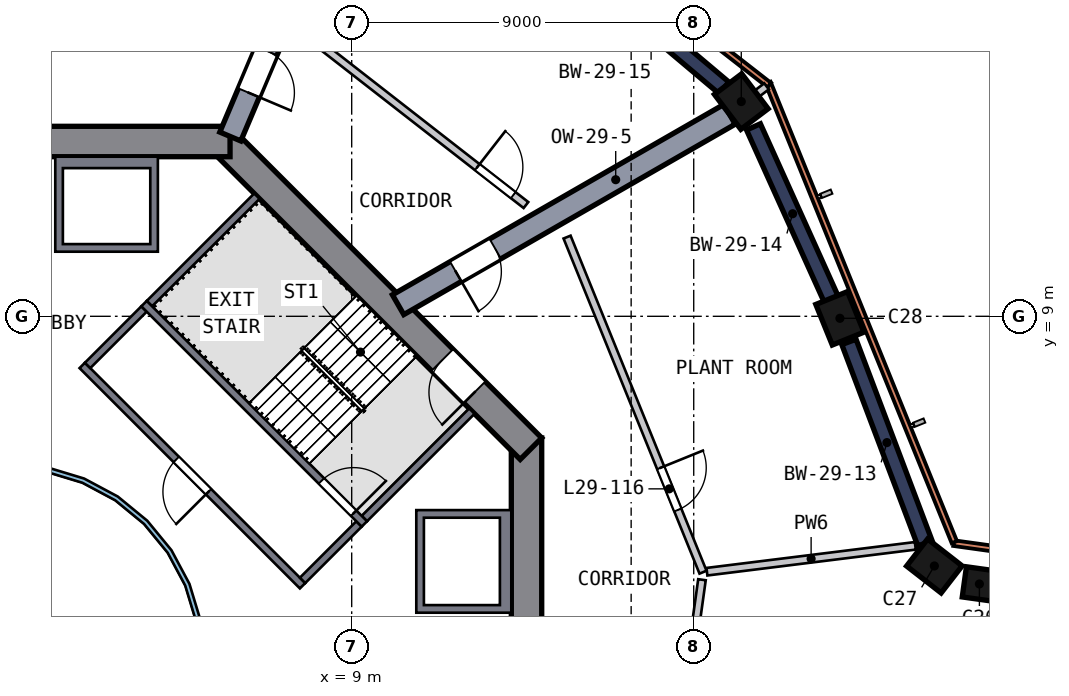
"""IFC4 building model, lengths in metres.
Left out: names, types, materials, properties, quantities, classifications, styles, units other than length and angle.
Written with IfcOpenShell. Run it as: python <this file> out.ifc"""

import sys

from ifc_helpers import new_model, si_unit, direction, frame, frame_2d, origin, origin_2d, place, context, subcontext, project, spatial, polyline, rectangle, outline, extrude, element, fill, save


model = new_model("IFC4")
c1 = context("Model", 3, precision=1e-05, world=origin(), true_north=direction((0.0, 1.0)))
c2 = subcontext(c1, "Body", "Model", "MODEL_VIEW")
j1 = project(units=[si_unit("LENGTHUNIT", "METRE"), si_unit("PLANEANGLEUNIT", "RADIAN")], contexts=[c1])
p1 = place(None, origin())
s1 = spatial("IfcSite", under=j1, at=p1, CompositionType="ELEMENT")
p2 = place(p1, origin())
s2 = spatial("IfcBuilding", under=s1, at=p2, CompositionType="ELEMENT")
p3 = place(p2, frame((0.0, 0.0, 122.0)))
s3 = spatial("IfcBuildingStorey", under=s2, at=p3, CompositionType="ELEMENT", Elevation=122.0)
p4 = place(p3, frame((25.524, 1.871, 0.0), z_axis=(-0.005790352, 0.071053566, 0.997455695), x_axis=(-0.990459232, 0.136931133, -0.015503999)))
e1 = element("IfcColumn", 1, at=p4, inside=s3, PredefinedType="COLUMN", context=c2, shape_type="SweptSolid", body=[
    extrude(rectangle(XDim=0.8, YDim=0.8, at=origin_2d()), origin(), (0.0, 0.0, 1.0), 4.511),
])
p5 = place(p3, frame((24.341, 2.348, 0.0), z_axis=(-0.007144812, 0.067767459, 0.99767556), x_axis=(0.789708349, -0.611663802, 0.04720294)))
e2 = element("IfcColumn", 2, at=p5, inside=s3, PredefinedType="COLUMN", context=c2, shape_type="SweptSolid", body=[
    extrude(rectangle(XDim=1.15, YDim=0.9, at=origin_2d()), origin(), (0.0, 0.0, 1.0), 4.51),
])
p6 = place(p3, frame((21.877, 8.875, 0.0), z_axis=(-0.025227376, 0.060740591, 0.997834736), x_axis=(-0.374966282, 0.924702521, -0.0657688)))
e3 = element("IfcColumn", 3, at=p6, inside=s3, PredefinedType="COLUMN", context=c2, shape_type="SweptSolid", body=[
    extrude(rectangle(XDim=1.15, YDim=0.9, at=origin_2d()), origin(), (0.0, 0.0, 1.0), 4.51),
])
p7 = place(p3, frame((19.301, 14.586, 0.0), z_axis=(-0.041084756, 0.053426422, 0.997726245), x_axis=(0.60153064, -0.796001802, 0.067394506)))
e4 = element("IfcColumn", 4, at=p7, inside=s3, PredefinedType="COLUMN", context=c2, shape_type="SweptSolid", body=[
    extrude(rectangle(XDim=1.15, YDim=0.9, at=origin_2d()), origin(), (0.0, 0.0, 1.0), 4.51),
])
p8 = place(p3, frame((13.6, -5.799, 0.0), z_axis=(0.0, 0.0, 1.0), x_axis=(0.0, 1.0, 0.0)))
e5 = element("IfcWall", 5, at=p8, inside=s3, PredefinedType="SHEAR", context=c2, shape_type="SweptSolid", body=[
    extrude(rectangle(XDim=11.598, YDim=0.8, at=frame_2d((5.799, 0.0))), origin(), (0.0, 0.0, 1.0), 6.0),
])
p9 = place(p8, frame((4.899, 0.0, 0.0)))
e6 = element("IfcOpeningElement", 6, at=p9, cuts=e5, PredefinedType="OPENING", context=c2, shape_type="SweptSolid", body=[
    extrude(rectangle(XDim=1.8, YDim=2.1, at=frame_2d((0.9, 1.05))), frame((0.0, 0.41, 0.0), z_axis=(0.0, -1.0, 0.0), x_axis=(1.0, 0.0, 0.0)), (0.0, 0.0, 1.0), 0.82),
])
p10 = place(p3, frame((13.717, 5.516, 0.0), z_axis=(0.0, 0.0, 1.0), x_axis=(-0.707106781, 0.707106781, 0.0)))
e7 = element("IfcWall", 7, at=p10, inside=s3, PredefinedType="SHEAR", context=c2, shape_type="SweptSolid", body=[
    extrude(rectangle(XDim=11.598, YDim=0.8, at=frame_2d((5.799, 0.0))), origin(), (0.0, 0.0, 1.0), 6.0),
])
p11 = place(p10, frame((2.099, 0.0, 0.0)))
e8 = element("IfcOpeningElement", 8, at=p11, cuts=e7, PredefinedType="OPENING", context=c2, shape_type="SweptSolid", body=[
    extrude(rectangle(XDim=1.2, YDim=2.1, at=frame_2d((0.6, 1.05))), frame((0.0, 0.41, 0.0), z_axis=(0.0, -1.0, 0.0), x_axis=(1.0, 0.0, 0.0)), (0.0, 0.0, 1.0), 0.82),
])
p12 = place(p3, frame((5.799, 13.6, 0.0), z_axis=(0.0, 0.0, 1.0), x_axis=(-1.0, 0.0, 0.0)))
e9 = element("IfcWall", 9, at=p12, inside=s3, PredefinedType="SHEAR", context=c2, shape_type="SweptSolid", body=[
    extrude(rectangle(XDim=11.598, YDim=0.8, at=frame_2d((5.799, 0.0))), origin(), (0.0, 0.0, 1.0), 6.0),
])
p13 = place(p12, frame((4.899, 0.0, 0.0)))
e10 = element("IfcOpeningElement", 10, at=p13, cuts=e9, PredefinedType="OPENING", context=c2, shape_type="SweptSolid", body=[
    extrude(rectangle(XDim=1.8, YDim=2.1, at=frame_2d((0.9, 1.05))), frame((0.0, 0.41, 0.0), z_axis=(0.0, -1.0, 0.0), x_axis=(1.0, 0.0, 0.0)), (0.0, 0.0, 1.0), 0.82),
])
p14 = place(p3, frame((24.084, 3.027, 0.0), z_axis=(0.0, 0.0, 1.0), x_axis=(-0.353210296, 0.935543952, 0.0)))
e11 = element("IfcWall", 11, at=p14, inside=s3, PredefinedType="SHEAR", context=c2, shape_type="SweptSolid", body=[
    extrude(rectangle(XDim=5.664, YDim=0.4, at=frame_2d((2.832, 0.0))), origin(), (0.0, 0.0, 1.0), 4.5),
])
p15 = place(p3, frame((21.634, 9.414, 0.0), z_axis=(0.0, 0.0, 1.0), x_axis=(-0.411115687, 0.911583179, 0.0)))
e12 = element("IfcWall", 12, at=p15, inside=s3, PredefinedType="SHEAR", context=c2, shape_type="SweptSolid", body=[
    extrude(rectangle(XDim=5.014, YDim=0.4, at=frame_2d((2.507, 0.0))), origin(), (0.0, 0.0, 1.0), 4.5),
])
p16 = place(p3, frame((18.796, 15.012, 0.0), z_axis=(0.0, 0.0, 1.0), x_axis=(-0.764745764, 0.644332147, 0.0)))
e13 = element("IfcWall", 13, at=p16, inside=s3, PredefinedType="SHEAR", context=c2, shape_type="SweptSolid", body=[
    extrude(rectangle(XDim=5.014, YDim=0.4, at=frame_2d((2.507, 0.0))), origin(), (0.0, 0.0, 1.0), 4.5),
])
p17 = place(p3, frame((10.221, 9.305, 0.0), z_axis=(0.0, 0.0, 1.0), x_axis=(0.867084572, 0.498160963, 0.0)))
e14 = element("IfcWall", 14, at=p17, inside=s3, PredefinedType="SHEAR", context=c2, shape_type="SweptSolid", body=[
    extrude(rectangle(XDim=10.058, YDim=0.6, at=frame_2d((5.029, 0.0))), origin(), (0.0, 0.0, 1.0), 4.5),
])
p18 = place(p17, frame((1.75, 0.0, 0.0)))
e15 = element("IfcOpeningElement", 15, at=p18, cuts=e14, PredefinedType="OPENING", context=c2, shape_type="SweptSolid", body=[
    extrude(rectangle(XDim=1.2, YDim=2.1, at=frame_2d((0.6, 1.05))), frame((0.0, 0.31, 0.0), z_axis=(0.0, -1.0, 0.0), x_axis=(1.0, 0.0, 0.0)), (0.0, 0.0, 1.0), 0.62),
])
p19 = place(p3, frame((5.806, 13.731, 0.0), z_axis=(0.0, 0.0, 1.0), x_axis=(0.389448866, 0.921048088, 0.0)))
e16 = element("IfcWall", 16, at=p19, inside=s3, PredefinedType="SHEAR", context=c2, shape_type="SweptSolid", body=[
    extrude(rectangle(XDim=8.835, YDim=0.6, at=frame_2d((4.417, 0.0))), origin(), (0.0, 0.0, 1.0), 4.5),
])
p20 = place(p19, frame((1.25, 0.0, 0.0)))
e17 = element("IfcOpeningElement", 17, at=p20, cuts=e16, PredefinedType="OPENING", context=c2, shape_type="SweptSolid", body=[
    extrude(rectangle(XDim=1.2, YDim=2.1, at=frame_2d((0.6, 1.05))), frame((0.0, 0.31, 0.0), z_axis=(0.0, -1.0, 0.0), x_axis=(1.0, 0.0, 0.0)), (0.0, 0.0, 1.0), 0.62),
])
p21 = place(p3, frame((26.789, 2.76, 0.0), z_axis=(0.0, 0.0, 1.0), x_axis=(-0.990456115, 0.137828457, 0.0)))
e18 = element("IfcWall", 18, at=p21, inside=s3, PredefinedType="SOLIDWALL", context=c2, shape_type="SweptSolid", body=[
    extrude(rectangle(XDim=1.97, YDim=0.15, at=frame_2d((0.985, 0.0))), origin(), (0.0, 0.0, 1.0), 4.5),
])
p22 = place(p3, frame((24.857, 3.056, 0.0), z_axis=(0.0, 0.0, 1.0), x_axis=(-0.375893619, 0.926662823, 0.0)))
e19 = element("IfcWall", 19, at=p22, inside=s3, PredefinedType="SOLIDWALL", context=c2, shape_type="SweptSolid", body=[
    extrude(rectangle(XDim=13.046, YDim=0.15, at=frame_2d((6.523, 0.0))), origin(), (0.0, 0.0, 1.0), 4.5),
])
p23 = place(p3, frame((19.99, 15.083, 0.0), z_axis=(0.0, 0.0, 1.0), x_axis=(-0.788865857, 0.614565423, 0.0)))
e20 = element("IfcWall", 20, at=p23, inside=s3, PredefinedType="SOLIDWALL", context=c2, shape_type="SweptSolid", body=[
    extrude(rectangle(XDim=13.035, YDim=0.15, at=frame_2d((6.518, 0.0))), origin(), (0.0, 0.0, 1.0), 4.5),
])
p24 = place(p3, origin())
e21 = element("IfcWall", 21, at=p24, inside=s3, PredefinedType="SOLIDWALL", context=c2, shape_type="SweptSolid", body=[
    extrude(outline(polyline([(10.7, 3.9), (13.2, 3.9), (13.2, 1.2), (10.7, 1.2), (10.7, 3.9)]), holes=[polyline([(12.9, 1.4), (12.9, 3.7), (10.9, 3.7), (10.9, 1.4), (12.9, 1.4)])]), origin(), (0.0, 0.0, 1.0), 5.55),
])
p25 = place(p3, origin())
e22 = element("IfcWall", 22, at=p25, inside=s3, PredefinedType="SOLIDWALL", context=c2, shape_type="SweptSolid", body=[
    extrude(outline(polyline([(1.2, 13.2), (3.9, 13.2), (3.9, 10.7), (1.2, 10.7), (1.2, 13.2)]), holes=[polyline([(3.7, 10.9), (3.7, 12.9), (1.4, 12.9), (1.4, 10.9), (3.7, 10.9)])]), origin(), (0.0, 0.0, 1.0), 5.55),
])
p26 = place(p3, frame((3.535, 9.334, 0.0), z_axis=(0.0, 0.0, 1.0), x_axis=(0.707106781, -0.707106781, 0.0)))
e23 = element("IfcWall", 23, at=p26, inside=s3, PredefinedType="SOLIDWALL", context=c2, shape_type="SweptSolid", body=[
    extrude(rectangle(XDim=8.2, YDim=0.2, at=frame_2d((4.1, 0.0))), origin(), (0.0, 0.0, 1.0), 5.55),
])
p27 = place(p26, frame((6.6, 0.0, 0.0)))
e24 = element("IfcOpeningElement", 24, at=p27, cuts=e23, PredefinedType="OPENING", context=c2, shape_type="SweptSolid", body=[
    extrude(rectangle(XDim=1.2, YDim=2.1, at=frame_2d((0.6, 1.05))), frame((0.0, 0.11, 0.0), z_axis=(0.0, -1.0, 0.0), x_axis=(1.0, 0.0, 0.0)), (0.0, 0.0, 1.0), 0.22),
])
for number, where, z_axis, x_axis in (
    (25, (9.334, 3.677, 0.0), (0.0, 0.0, 1.0), (0.707, 0.707, 0.0)),
    (26, (3.677, 9.334, 0.0), (0.0, 0.0, 1.0), (0.707, 0.707, 0.0)),
):
    element("IfcWall", number, at=place(p3, frame(where, z_axis=z_axis, x_axis=x_axis)), inside=s3, PredefinedType="SOLIDWALL", context=c2, shape_type="SweptSolid", body=[
        extrude(rectangle(XDim=4.0, YDim=0.2, at=frame_2d((2.0, 0.0))), origin(), (0.0, 0.0, 1.0), 5.55),
    ])
p28 = place(p3, frame((7.708, 1.909, 0.0), z_axis=(0.0, 0.0, 1.0), x_axis=(-0.707106781, 0.707106781, 0.0)))
e27 = element("IfcWall", 27, at=p28, inside=s3, PredefinedType="SOLIDWALL", context=c2, shape_type="SweptSolid", body=[
    extrude(rectangle(XDim=8.2, YDim=0.2, at=frame_2d((4.1, 0.0))), origin(), (0.0, 0.0, 1.0), 5.55),
])
p29 = place(p28, frame((3.5, 0.0, 0.0)))
e28 = element("IfcOpeningElement", 28, at=p29, cuts=e27, PredefinedType="OPENING", context=c2, shape_type="SweptSolid", body=[
    extrude(rectangle(XDim=1.2, YDim=2.1, at=frame_2d((0.6, 1.05))), frame((0.0, 0.11, 0.0), z_axis=(0.0, -1.0, 0.0), x_axis=(1.0, 0.0, 0.0)), (0.0, 0.0, 1.0), 0.22),
])
for number, where, z_axis, x_axis in (
    (29, (7.708, 2.051, 0.0), (0.0, 0.0, 1.0), (0.707, 0.707, 0.0)),
    (30, (2.051, 7.708, 0.0), (0.0, 0.0, 1.0), (0.707, 0.707, 0.0)),
):
    element("IfcWall", number, at=place(p3, frame(where, z_axis=z_axis, x_axis=x_axis)), inside=s3, PredefinedType="SOLIDWALL", context=c2, shape_type="SweptSolid", body=[
        extrude(rectangle(XDim=2.1, YDim=0.2, at=frame_2d((1.05, 0.0))), origin(), (0.0, 0.0, 1.0), 5.55),
    ])
p30 = place(p3, origin())
e31 = element("IfcWall", 31, at=p30, inside=s3, PredefinedType="SOLIDWALL", context=c2, shape_type="SweptSolid", body=[
    extrude(outline(polyline([(5.021, -0.999), (4.73, -1.959), (4.257, -2.844), (3.62, -3.62), (2.844, -4.257), (1.959, -4.73), (0.999, -5.021), (0.0, -5.12), (-0.999, -5.021), (-1.959, -4.73), (-2.844, -4.257), (-3.62, -3.62), (-4.257, -2.844), (-4.73, -1.959), (-5.021, -0.999), (-5.12, 0.0), (-5.021, 0.999), (-4.73, 1.959), (-4.257, 2.844), (-3.62, 3.62), (-2.844, 4.257), (-1.959, 4.73), (-0.999, 5.021), (0.0, 5.12), (0.999, 5.021), (1.959, 4.73), (2.844, 4.257), (3.62, 3.62), (4.257, 2.844), (4.73, 1.959), (5.021, 0.999), (5.12, 0.0), (5.021, -0.999)]), holes=[polyline([(4.904, 0.976), (4.619, 1.913), (4.157, 2.778), (3.535, 3.535), (2.778, 4.157), (1.913, 4.619), (0.976, 4.904), (0.0, 5.0), (-0.976, 4.904), (-1.913, 4.619), (-2.778, 4.157), (-3.535, 3.535), (-4.157, 2.778), (-4.619, 1.913), (-4.904, 0.976), (-5.0, 0.0), (-4.904, -0.976), (-4.619, -1.913), (-4.157, -2.778), (-3.535, -3.535), (-2.778, -4.157), (-1.913, -4.619), (-0.976, -4.904), (0.0, -5.0), (0.976, -4.904), (1.913, -4.619), (2.778, -4.157), (3.535, -3.535), (4.157, -2.778), (4.619, -1.913), (4.904, -0.976), (5.0, 0.0), (4.904, 0.976)])]), origin(), (0.0, 0.0, 1.0), 5.55),
])
p31 = place(p3, frame((7.65, 16.552, 0.0), z_axis=(0.0, 0.0, 1.0), x_axis=(0.788857495, -0.614576157, 0.0)))
e32 = element("IfcWall", 32, at=p31, inside=s3, PredefinedType="SOLIDWALL", context=c2, shape_type="SweptSolid", body=[
    extrude(rectangle(XDim=7.524, YDim=0.2, at=frame_2d((3.762, 0.0))), origin(), (0.0, 0.0, 1.0), 4.5),
])
p32 = place(p31, frame((5.9, 0.0, 0.0)))
e33 = element("IfcOpeningElement", 33, at=p32, cuts=e32, PredefinedType="OPENING", context=c2, shape_type="SweptSolid", body=[
    extrude(rectangle(XDim=1.2, YDim=2.1, at=frame_2d((0.6, 1.05))), frame((0.0, 0.11, 0.0), z_axis=(0.0, -1.0, 0.0), x_axis=(1.0, 0.0, 0.0)), (0.0, 0.0, 1.0), 0.22),
])
p33 = place(p3, frame((14.667, 11.085, 0.0), z_axis=(0.0, 0.0, 1.0), x_axis=(0.375911138, -0.926655716, 0.0)))
e34 = element("IfcWall", 34, at=p33, inside=s3, PredefinedType="SOLIDWALL", context=c2, shape_type="SweptSolid", body=[
    extrude(rectangle(XDim=9.517, YDim=0.2, at=frame_2d((4.758, 0.0))), origin(), (0.0, 0.0, 1.0), 4.5),
])
p34 = place(p33, frame((6.55, 0.0, 0.0)))
e35 = element("IfcOpeningElement", 35, at=p34, cuts=e34, PredefinedType="OPENING", context=c2, shape_type="SweptSolid", body=[
    extrude(rectangle(XDim=1.2, YDim=2.1, at=frame_2d((0.6, 1.05))), frame((0.0, 0.11, 0.0), z_axis=(0.0, -1.0, 0.0), x_axis=(1.0, 0.0, 0.0)), (0.0, 0.0, 1.0), 0.22),
])
p35 = place(p3, frame((18.217, 2.068, 0.0), z_axis=(0.0, 0.0, 1.0), x_axis=(-0.137784751, -0.990462196, 0.0)))
e36 = element("IfcWall", 36, at=p35, inside=s3, PredefinedType="SOLIDWALL", context=c2, shape_type="SweptSolid", body=[
    extrude(rectangle(XDim=9.317, YDim=0.2, at=frame_2d((4.658, 0.0))), origin(), (0.0, 0.0, 1.0), 4.5),
])
p36 = place(p35, frame((3.95, 0.0, 0.0)))
e37 = element("IfcOpeningElement", 37, at=p36, cuts=e36, PredefinedType="OPENING", context=c2, shape_type="SweptSolid", body=[
    extrude(rectangle(XDim=1.2, YDim=2.1, at=frame_2d((0.6, 1.05))), frame((0.0, 0.11, 0.0), z_axis=(0.0, -1.0, 0.0), x_axis=(1.0, 0.0, 0.0)), (0.0, 0.0, 1.0), 0.22),
])
p37 = place(p3, frame((18.978, 14.343, 0.0), z_axis=(0.0, 0.0, 1.0), x_axis=(0.797851786, 0.602853653, 0.0)))
e38 = element("IfcWall", 38, at=p37, inside=s3, PredefinedType="SOLIDWALL", context=c2, shape_type="SweptSolid", body=[
    extrude(rectangle(XDim=1.176, YDim=0.2, at=frame_2d((0.588, 0.0))), origin(), (0.0, 0.0, 1.0), 4.5),
])
p38 = place(p3, frame((18.347, 2.279, 0.0), z_axis=(0.0, 0.0, 1.0), x_axis=(0.99237275, 0.123273374, 0.0)))
e39 = element("IfcWall", 39, at=p38, inside=s3, PredefinedType="SOLIDWALL", context=c2, shape_type="SweptSolid", body=[
    extrude(rectangle(XDim=5.526, YDim=0.2, at=frame_2d((2.763, 0.0))), origin(), (0.0, 0.0, 1.0), 4.5),
])
p39 = place(p27, origin())
e40 = element("IfcDoor", 40, at=p39, inside=s3, OperationType="SINGLE_SWING_RIGHT", PredefinedType="DOOR", context=c2, shape_type="SweptSolid", body=[
    extrude(rectangle(XDim=1.2, YDim=2.1, at=frame_2d((0.6, 1.05))), frame((0.0, 0.025, 0.0), z_axis=(0.0, -1.0, 0.0), x_axis=(1.0, 0.0, 0.0)), (0.0, 0.0, 1.0), 0.05),
])
fill(e24, e40)
p40 = place(p11, origin())
e41 = element("IfcDoor", 41, at=p40, inside=s3, OperationType="SINGLE_SWING_LEFT", PredefinedType="DOOR", context=c2, shape_type="SweptSolid", body=[
    extrude(rectangle(XDim=1.2, YDim=2.1, at=frame_2d((0.6, 1.05))), frame((0.0, 0.025, 0.0), z_axis=(0.0, -1.0, 0.0), x_axis=(1.0, 0.0, 0.0)), (0.0, 0.0, 1.0), 0.05),
])
fill(e8, e41)
p41 = place(p29, origin())
e42 = element("IfcDoor", 42, at=p41, inside=s3, OperationType="SINGLE_SWING_LEFT", PredefinedType="DOOR", context=c2, shape_type="SweptSolid", body=[
    extrude(rectangle(XDim=1.2, YDim=2.1, at=frame_2d((0.6, 1.05))), frame((0.0, 0.025, 0.0), z_axis=(0.0, -1.0, 0.0), x_axis=(1.0, 0.0, 0.0)), (0.0, 0.0, 1.0), 0.05),
])
fill(e28, e42)
p42 = place(p18, origin())
e43 = element("IfcDoor", 43, at=p42, inside=s3, OperationType="SINGLE_SWING_LEFT", PredefinedType="DOOR", context=c2, shape_type="SweptSolid", body=[
    extrude(rectangle(XDim=1.2, YDim=2.1, at=frame_2d((0.6, 1.05))), frame((0.0, 0.025, 0.0), z_axis=(0.0, -1.0, 0.0), x_axis=(1.0, 0.0, 0.0)), (0.0, 0.0, 1.0), 0.05),
])
fill(e15, e43)
p43 = place(p20, origin())
e44 = element("IfcDoor", 44, at=p43, inside=s3, OperationType="SINGLE_SWING_LEFT", PredefinedType="DOOR", context=c2, shape_type="SweptSolid", body=[
    extrude(rectangle(XDim=1.2, YDim=2.1, at=frame_2d((0.6, 1.05))), frame((0.0, 0.025, 0.0), z_axis=(0.0, -1.0, 0.0), x_axis=(1.0, 0.0, 0.0)), (0.0, 0.0, 1.0), 0.05),
])
fill(e17, e44)
p44 = place(p34, origin())
e45 = element("IfcDoor", 45, at=p44, inside=s3, OperationType="SINGLE_SWING_LEFT", PredefinedType="DOOR", context=c2, shape_type="SweptSolid", body=[
    extrude(rectangle(XDim=1.2, YDim=2.1, at=frame_2d((0.6, 1.05))), frame((0.0, 0.025, 0.0), z_axis=(0.0, -1.0, 0.0), x_axis=(1.0, 0.0, 0.0)), (0.0, 0.0, 1.0), 0.05),
])
fill(e35, e45)
p45 = place(p32, origin())
e46 = element("IfcDoor", 46, at=p45, inside=s3, OperationType="SINGLE_SWING_LEFT", PredefinedType="DOOR", context=c2, shape_type="SweptSolid", body=[
    extrude(rectangle(XDim=1.2, YDim=2.1, at=frame_2d((0.6, 1.05))), frame((0.0, 0.025, 0.0), z_axis=(0.0, -1.0, 0.0), x_axis=(1.0, 0.0, 0.0)), (0.0, 0.0, 1.0), 0.05),
])
fill(e33, e46)
save(model, sys.argv[1])
